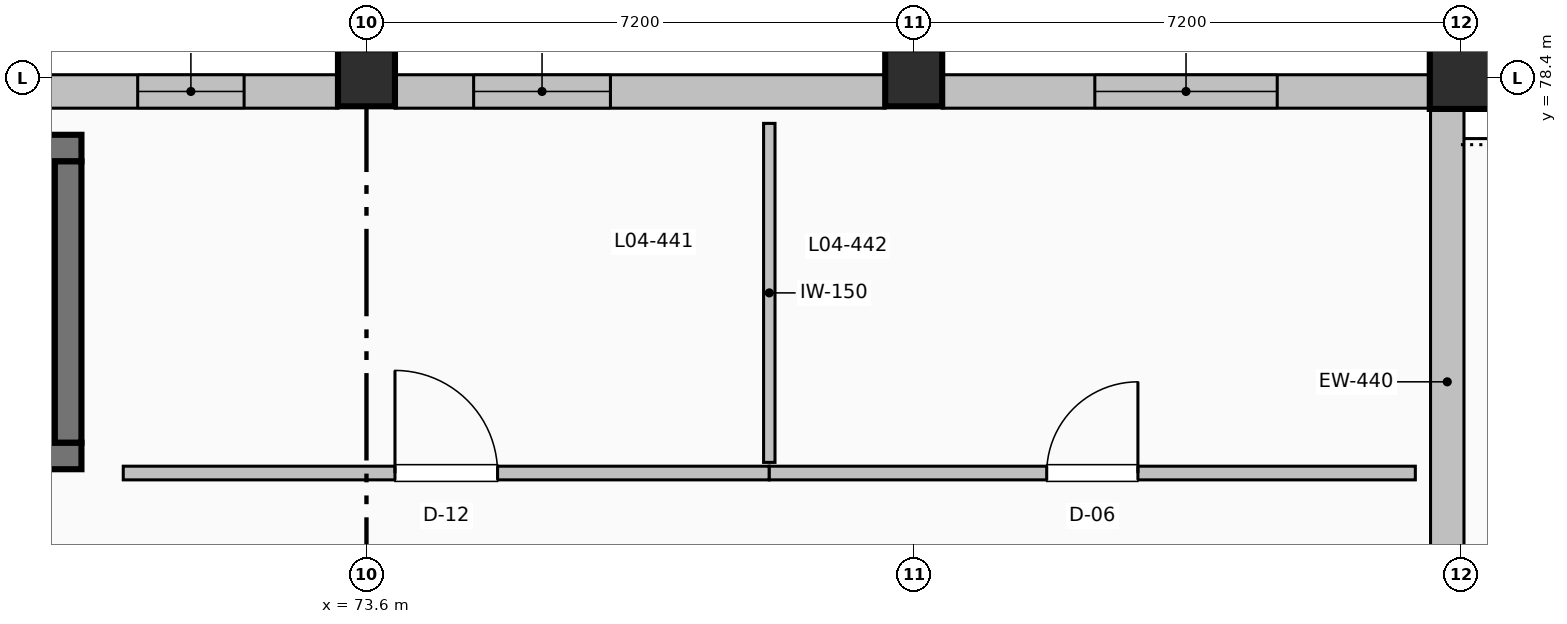
"""IFC4 building model, lengths in metres.
Left out: names, types, materials, properties, quantities, classifications, styles, units other than length and angle.
Written with IfcOpenShell. Run it as: python <this file> out.ifc"""

import sys

from ifc_helpers import new_model, si_unit, direction, frame, frame_2d, origin, origin_2d, place, context, subcontext, project, spatial, rectangle, extrude, element, fill, save


model = new_model("IFC4")
c1 = context("Model", 3, precision=1e-05, world=origin(), true_north=direction((0.0, 1.0)))
c2 = subcontext(c1, "Body", "Model", "MODEL_VIEW")
j1 = project(units=[si_unit("LENGTHUNIT", "METRE"), si_unit("PLANEANGLEUNIT", "RADIAN")], contexts=[c1])
p1 = place(None, origin())
s1 = spatial("IfcSite", under=j1, at=p1, CompositionType="ELEMENT")
p2 = place(p1, origin())
s2 = spatial("IfcBuilding", under=s1, at=p2, CompositionType="ELEMENT")
p3 = place(p2, frame((0.0, 0.0, 19.5)))
s3 = spatial("IfcBuildingStorey", under=s2, at=p3, CompositionType="ELEMENT", Elevation=19.5)
for number, where, z_axis, x_axis in (
    (1, (73.6, 78.4, 0.0), (0.0, 0.0, 1.0), (1.0, 0.0, 0.0)),
    (2, (80.8, 78.4, 0.0), (0.0, 0.0, 1.0), (1.0, 0.0, 0.0)),
):
    element("IfcColumn", number, at=place(p3, frame(where, z_axis=z_axis, x_axis=x_axis)), inside=s3, PredefinedType="COLUMN", context=c2, shape_type="SweptSolid", body=[
        extrude(rectangle(XDim=0.75, YDim=0.75, at=origin_2d()), origin(), (0.0, 0.0, 1.0), 4.5),
    ])
p4 = place(p3, frame((88.0, 78.4, 0.0), z_axis=(0.0, 0.0, 1.0), x_axis=(1.0, 0.0, 0.0)))
e3 = element("IfcColumn", 3, at=p4, inside=s3, PredefinedType="COLUMN", context=c2, shape_type="SweptSolid", body=[
    extrude(rectangle(XDim=0.82, YDim=0.82, at=origin_2d()), origin(), (0.0, 0.0, 1.0), 4.5),
])
for number, where, z_axis, x_axis in (
    (4, (61.45, 73.425, 0.0), (0.0, 0.0, 1.0), (1.0, 0.0, 0.0)),
    (5, (69.85, 77.475, 0.0), (0.0, 0.0, 1.0), (-1.0, 0.0, 0.0)),
):
    element("IfcWall", number, at=place(p3, frame(where, z_axis=z_axis, x_axis=x_axis)), inside=s3, PredefinedType="SHEAR", context=c2, shape_type="SweptSolid", body=[
        extrude(rectangle(XDim=8.4, YDim=0.35, at=frame_2d((4.2, 0.0))), origin(), (0.0, 0.0, 1.0), 4.22),
    ])
p5 = place(p3, frame((69.675, 77.3, 0.0), z_axis=(0.0, 0.0, 1.0), x_axis=(0.0, -1.0, 0.0)))
e6 = element("IfcWall", 6, at=p5, inside=s3, PredefinedType="SHEAR", context=c2, shape_type="SweptSolid", body=[
    extrude(rectangle(XDim=3.7, YDim=0.35, at=frame_2d((1.85, 0.0))), origin(), (0.0, 0.0, 1.0), 4.22),
])
p6 = place(p3, frame((87.82, 77.99, 0.0), z_axis=(0.0, 0.0, 1.0), x_axis=(0.0, -1.0, 0.0)))
e7 = element("IfcWall", 7, at=p6, inside=s3, PredefinedType="SOLIDWALL", context=c2, shape_type="SweptSolid", body=[
    extrude(rectangle(XDim=7.18, YDim=0.44, at=frame_2d((3.59, 0.0))), origin(), (0.0, 0.0, 1.0), 3.462),
])
p7 = place(p3, frame((66.775, 78.22, 0.0), z_axis=(0.0, 0.0, 1.0), x_axis=(1.0, 0.0, 0.0)))
e8 = element("IfcWall", 8, at=p7, inside=s3, PredefinedType="SOLIDWALL", context=c2, shape_type="SweptSolid", body=[
    extrude(rectangle(XDim=6.45, YDim=0.44, at=frame_2d((3.225, 0.0))), origin(), (0.0, 0.0, 1.0), 3.462),
])
p8 = place(p7, frame((1.235, 0.0, 1.0)))
e9 = element("IfcOpeningElement", 9, at=p8, cuts=e8, PredefinedType="OPENING", context=c2, shape_type="SweptSolid", body=[
    extrude(rectangle(XDim=1.4, YDim=1.2, at=frame_2d((0.7, 0.6))), frame((0.0, 0.23, 0.0), z_axis=(0.0, -1.0, 0.0), x_axis=(1.0, 0.0, 0.0)), (0.0, 0.0, 1.0), 0.46),
])
p9 = place(p7, frame((3.815, 0.0, 1.0)))
e10 = element("IfcOpeningElement", 10, at=p9, cuts=e8, PredefinedType="OPENING", context=c2, shape_type="SweptSolid", body=[
    extrude(rectangle(XDim=1.4, YDim=1.2, at=frame_2d((0.7, 0.6))), frame((0.0, 0.23, 0.0), z_axis=(0.0, -1.0, 0.0), x_axis=(1.0, 0.0, 0.0)), (0.0, 0.0, 1.0), 0.46),
])
p10 = place(p3, frame((73.975, 78.22, 0.0), z_axis=(0.0, 0.0, 1.0), x_axis=(1.0, 0.0, 0.0)))
e11 = element("IfcWall", 11, at=p10, inside=s3, PredefinedType="SOLIDWALL", context=c2, shape_type="SweptSolid", body=[
    extrude(rectangle(XDim=6.45, YDim=0.44, at=frame_2d((3.225, 0.0))), origin(), (0.0, 0.0, 1.0), 3.462),
])
p11 = place(p10, frame((1.035, 0.0, 1.05)))
e12 = element("IfcOpeningElement", 12, at=p11, cuts=e11, PredefinedType="OPENING", context=c2, shape_type="SweptSolid", body=[
    extrude(rectangle(XDim=1.8, YDim=1.25, at=frame_2d((0.9, 0.625))), frame((0.0, 0.23, 0.0), z_axis=(0.0, -1.0, 0.0), x_axis=(1.0, 0.0, 0.0)), (0.0, 0.0, 1.0), 0.46),
])
p12 = place(p3, frame((81.175, 78.22, 0.0), z_axis=(0.0, 0.0, 1.0), x_axis=(1.0, 0.0, 0.0)))
e13 = element("IfcWall", 13, at=p12, inside=s3, PredefinedType="SOLIDWALL", context=c2, shape_type="SweptSolid", body=[
    extrude(rectangle(XDim=6.415, YDim=0.44, at=frame_2d((3.208, 0.0))), origin(), (0.0, 0.0, 1.0), 3.462),
])
p13 = place(p12, frame((2.008, 0.0, 1.05)))
e14 = element("IfcOpeningElement", 14, at=p13, cuts=e13, PredefinedType="OPENING", context=c2, shape_type="SweptSolid", body=[
    extrude(rectangle(XDim=2.4, YDim=1.25, at=frame_2d((1.2, 0.625))), frame((0.0, 0.23, 0.0), z_axis=(0.0, -1.0, 0.0), x_axis=(1.0, 0.0, 0.0)), (0.0, 0.0, 1.0), 0.46),
])
p14 = place(p3, frame((70.4, 73.2, 0.0), z_axis=(0.0, 0.0, 1.0), x_axis=(1.0, 0.0, 0.0)))
e15 = element("IfcWall", 15, at=p14, inside=s3, PredefinedType="PARTITIONING", context=c2, shape_type="SweptSolid", body=[
    extrude(rectangle(XDim=8.5, YDim=0.18, at=frame_2d((4.25, 0.0))), origin(), (0.0, 0.0, 1.0), 4.192),
])
p15 = place(p14, frame((3.575, 0.0, 0.0)))
e16 = element("IfcOpeningElement", 16, at=p15, cuts=e15, PredefinedType="OPENING", context=c2, shape_type="SweptSolid", body=[
    extrude(rectangle(XDim=1.35, YDim=2.16, at=frame_2d((0.675, 1.08))), frame((0.0, 0.1, 0.0), z_axis=(0.0, -1.0, 0.0), x_axis=(1.0, 0.0, 0.0)), (0.0, 0.0, 1.0), 0.2),
])
p16 = place(p3, frame((78.9, 73.34, 0.0), z_axis=(0.0, 0.0, 1.0), x_axis=(0.0, 1.0, 0.0)))
e17 = element("IfcWall", 17, at=p16, inside=s3, PredefinedType="PARTITIONING", context=c2, shape_type="SweptSolid", body=[
    extrude(rectangle(XDim=4.46, YDim=0.15, at=frame_2d((2.23, 0.0))), origin(), (0.0, 0.0, 1.0), 4.192),
])
p17 = place(p3, frame((78.9, 73.2, 0.0), z_axis=(0.0, 0.0, 1.0), x_axis=(1.0, 0.0, 0.0)))
e18 = element("IfcWall", 18, at=p17, inside=s3, PredefinedType="PARTITIONING", context=c2, shape_type="SweptSolid", body=[
    extrude(rectangle(XDim=8.5, YDim=0.18, at=frame_2d((4.25, 0.0))), origin(), (0.0, 0.0, 1.0), 4.192),
])
p18 = place(p17, frame((3.65, 0.0, 0.0)))
e19 = element("IfcOpeningElement", 19, at=p18, cuts=e18, PredefinedType="OPENING", context=c2, shape_type="SweptSolid", body=[
    extrude(rectangle(XDim=1.2, YDim=2.1, at=frame_2d((0.6, 1.05))), frame((0.0, 0.1, 0.0), z_axis=(0.0, -1.0, 0.0), x_axis=(1.0, 0.0, 0.0)), (0.0, 0.0, 1.0), 0.2),
])
p19 = place(p9, origin())
e20 = element("IfcWindow", 20, at=p19, inside=s3, PartitioningType="SINGLE_PANEL", PredefinedType="WINDOW", context=c2, shape_type="SweptSolid", body=[
    extrude(rectangle(XDim=1.4, YDim=1.2, at=frame_2d((0.7, 0.6))), frame((0.0, 0.03, 0.0), z_axis=(0.0, -1.0, 0.0), x_axis=(1.0, 0.0, 0.0)), (0.0, 0.0, 1.0), 0.06),
])
fill(e10, e20)
p20 = place(p11, origin())
e21 = element("IfcWindow", 21, at=p20, inside=s3, PartitioningType="SINGLE_PANEL", PredefinedType="WINDOW", context=c2, shape_type="SweptSolid", body=[
    extrude(rectangle(XDim=1.8, YDim=1.25, at=frame_2d((0.9, 0.625))), frame((0.0, 0.03, 0.0), z_axis=(0.0, -1.0, 0.0), x_axis=(1.0, 0.0, 0.0)), (0.0, 0.0, 1.0), 0.06),
])
fill(e12, e21)
p21 = place(p13, origin())
e22 = element("IfcWindow", 22, at=p21, inside=s3, PartitioningType="SINGLE_PANEL", PredefinedType="WINDOW", context=c2, shape_type="SweptSolid", body=[
    extrude(rectangle(XDim=2.4, YDim=1.25, at=frame_2d((1.2, 0.625))), frame((0.0, 0.03, 0.0), z_axis=(0.0, -1.0, 0.0), x_axis=(1.0, 0.0, 0.0)), (0.0, 0.0, 1.0), 0.06),
])
fill(e14, e22)
p22 = place(p15, origin())
e23 = element("IfcDoor", 23, at=p22, inside=s3, OperationType="SINGLE_SWING_LEFT", PredefinedType="DOOR", context=c2, shape_type="SweptSolid", body=[
    extrude(rectangle(XDim=1.35, YDim=2.16, at=frame_2d((0.675, 1.08))), frame((0.0, 0.025, 0.0), z_axis=(0.0, -1.0, 0.0), x_axis=(1.0, 0.0, 0.0)), (0.0, 0.0, 1.0), 0.05),
])
fill(e16, e23)
p23 = place(p18, origin())
e24 = element("IfcDoor", 24, at=p23, inside=s3, OperationType="SINGLE_SWING_RIGHT", PredefinedType="DOOR", context=c2, shape_type="SweptSolid", body=[
    extrude(rectangle(XDim=1.2, YDim=2.1, at=frame_2d((0.6, 1.05))), frame((0.0, 0.025, 0.0), z_axis=(0.0, -1.0, 0.0), x_axis=(1.0, 0.0, 0.0)), (0.0, 0.0, 1.0), 0.05),
])
fill(e19, e24)
save(model, sys.argv[1])
